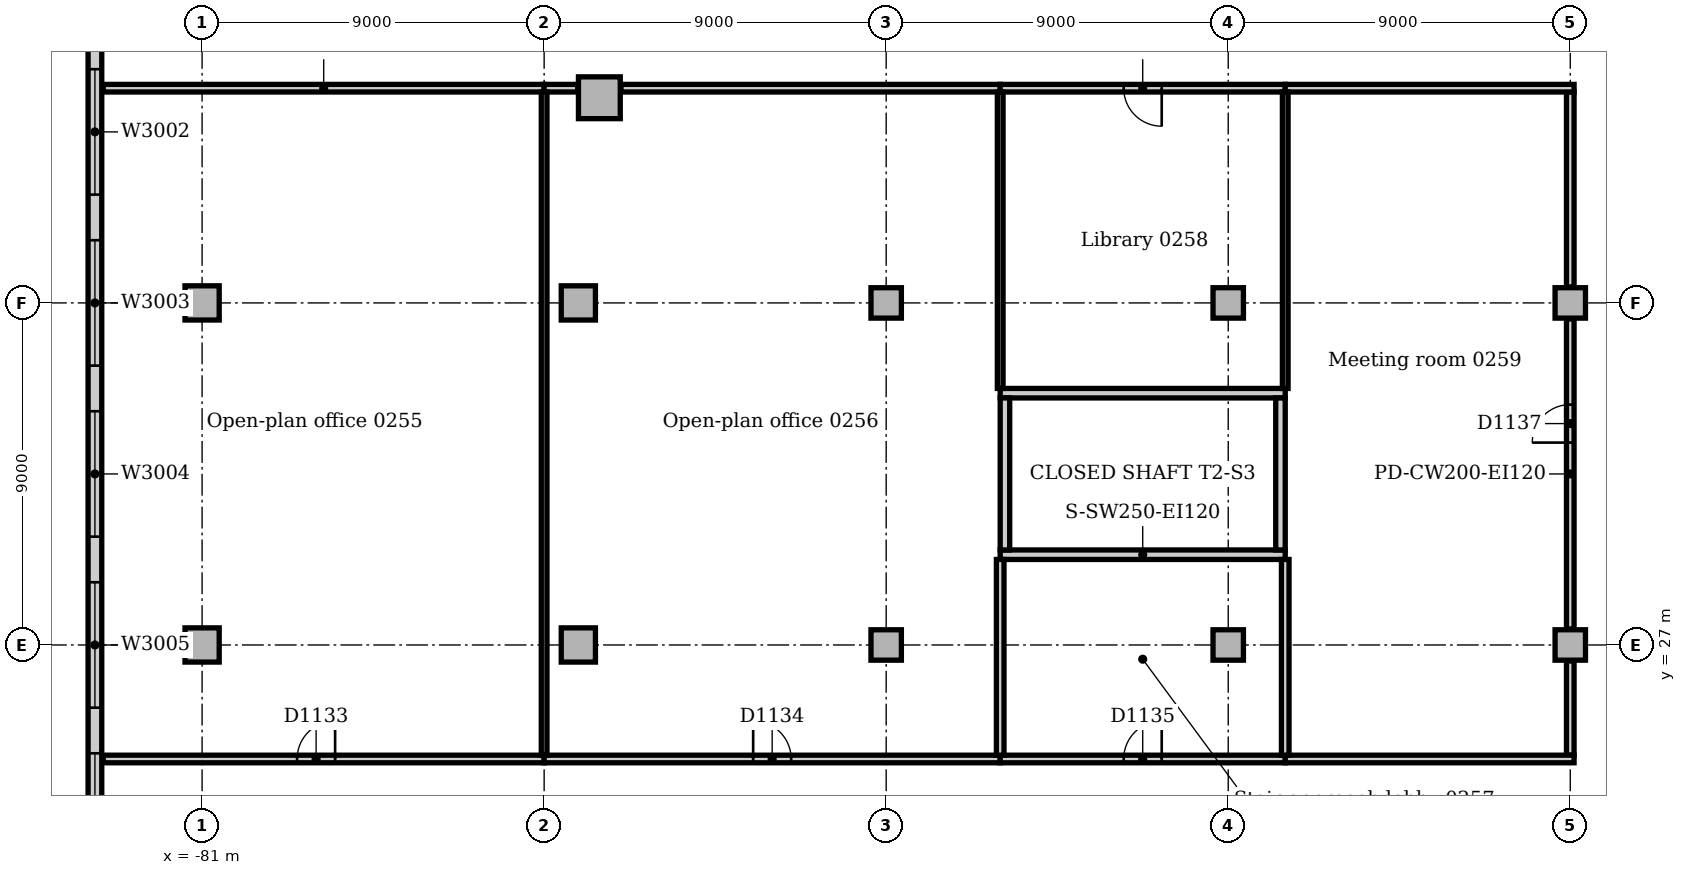
"""IFC4 building model, lengths in metres.
Left out: names, types, materials, properties, quantities, classifications, styles, units other than length and angle.
Written with IfcOpenShell. Run it as: python <this file> out.ifc"""

import sys

from ifc_helpers import new_model, si_unit, direction, frame, frame_2d, origin, origin_2d, place, context, subcontext, project, spatial, rectangle, extrude, element, fill, save


model = new_model("IFC4")
c1 = context("Model", 3, precision=1e-05, world=origin(), true_north=direction((0.0, 1.0)))
c2 = subcontext(c1, "Body", "Model", "MODEL_VIEW")
j1 = project(units=[si_unit("LENGTHUNIT", "METRE"), si_unit("PLANEANGLEUNIT", "RADIAN")], contexts=[c1])
p1 = place(None, origin())
s1 = spatial("IfcSite", under=j1, at=p1, CompositionType="ELEMENT")
p2 = place(p1, origin())
s2 = spatial("IfcBuilding", under=s1, at=p2, CompositionType="ELEMENT")
p3 = place(p2, frame((0.0, 0.0, 11.0)))
s3 = spatial("IfcBuildingStorey", under=s2, at=p3, CompositionType="ELEMENT", Elevation=11.0)
for number, where, z_axis, x_axis in (
    (1, (-60.0, 29.375, 0.0), (0.0, 0.0, 1.0), (1.0, 0.0, 0.0)),
    (2, (-52.5, 33.625, 0.0), (0.0, 0.0, 1.0), (-1.0, 0.0, 0.0)),
):
    element("IfcWall", number, at=place(p3, frame(where, z_axis=z_axis, x_axis=x_axis)), inside=s3, PredefinedType="SOLIDWALL", context=c2, shape_type="SweptSolid", body=[
        extrude(rectangle(XDim=7.5, YDim=0.25, at=frame_2d((3.75, 0.0))), origin(), (0.0, 0.0, 1.0), 5.0),
    ])
for number, where, z_axis, x_axis in (
    (3, (-52.625, 29.5, 0.0), (0.0, 0.0, 1.0), (0.0, 1.0, 0.0)),
    (4, (-59.875, 33.5, 0.0), (0.0, 0.0, 1.0), (0.0, -1.0, 0.0)),
):
    element("IfcWall", number, at=place(p3, frame(where, z_axis=z_axis, x_axis=x_axis)), inside=s3, PredefinedType="SOLIDWALL", context=c2, shape_type="SweptSolid", body=[
        extrude(rectangle(XDim=4.0, YDim=0.25, at=frame_2d((2.0, 0.0))), origin(), (0.0, 0.0, 1.0), 5.0),
    ])
p4 = place(p3, frame((-70.547, 41.398, 0.0), z_axis=(0.0, 0.0, 1.0), x_axis=(1.0, 0.0, 0.0)))
e5 = element("IfcColumn", 5, at=p4, inside=s3, PredefinedType="COLUMN", context=c2, shape_type="SweptSolid", body=[
    extrude(rectangle(XDim=1.1, YDim=1.1, at=origin_2d()), origin(), (0.0, 0.0, 1.0), 4.7),
])
for number, where, z_axis, x_axis in (
    (6, (-71.1, 27.0, 0.0), (0.0, 0.0, 1.0), (1.0, 0.0, 0.0)),
    (7, (-71.1, 36.0, 0.0), (0.0, 0.0, 1.0), (1.0, 0.0, 0.0)),
):
    element("IfcColumn", number, at=place(p3, frame(where, z_axis=z_axis, x_axis=x_axis)), inside=s3, PredefinedType="COLUMN", context=c2, shape_type="SweptSolid", body=[
        extrude(rectangle(XDim=0.9, YDim=0.9, at=origin_2d()), origin(), (0.0, 0.0, 1.0), 4.7),
    ])
for number, where, z_axis, x_axis in (
    (8, (-63.0, 27.0, 0.0), (0.0, 0.0, 1.0), (1.0, 0.0, 0.0)),
    (9, (-63.0, 36.0, 0.0), (0.0, 0.0, 1.0), (1.0, 0.0, 0.0)),
    (10, (-54.0, 27.0, 0.0), (0.0, 0.0, 1.0), (1.0, 0.0, 0.0)),
    (11, (-54.0, 36.0, 0.0), (0.0, 0.0, 1.0), (1.0, 0.0, 0.0)),
    (12, (-45.0, 27.0, 0.0), (0.0, 0.0, 1.0), (1.0, 0.0, 0.0)),
    (13, (-45.0, 36.0, 0.0), (0.0, 0.0, 1.0), (1.0, 0.0, 0.0)),
):
    element("IfcColumn", number, at=place(p3, frame(where, z_axis=z_axis, x_axis=x_axis)), inside=s3, PredefinedType="COLUMN", context=c2, shape_type="SweptSolid", body=[
        extrude(rectangle(XDim=0.8, YDim=0.8, at=origin_2d()), origin(), (0.0, 0.0, 1.0), 4.7),
    ])
for number, where, z_axis, x_axis in (
    (14, (-81.0, 27.0, 0.0), (0.0, 0.0, 1.0), (1.0, 0.0, 0.0)),
    (15, (-81.0, 36.0, 0.0), (0.0, 0.0, 1.0), (1.0, 0.0, 0.0)),
):
    element("IfcColumn", number, at=place(p3, frame(where, z_axis=z_axis, x_axis=x_axis)), inside=s3, PredefinedType="COLUMN", context=c2, shape_type="SweptSolid", body=[
        extrude(rectangle(XDim=0.9, YDim=0.9, at=origin_2d()), origin(), (0.0, 0.0, 1.0), 4.7),
    ])
p5 = place(p3, frame((-83.82, 54.0, 0.0), z_axis=(0.0, 0.0, 1.0), x_axis=(0.0, -1.0, 0.0)))
e16 = element("IfcWall", 16, at=p5, inside=s3, PredefinedType="STANDARD", context=c2, shape_type="SweptSolid", body=[
    extrude(rectangle(XDim=63.0, YDim=0.36, at=frame_2d((31.5, 0.0))), origin(), (0.0, 0.0, 1.0), 4.7),
])
p6 = place(p5, frame((2.85, 0.0, 0.9)))
e17 = element("IfcOpeningElement", 17, at=p6, cuts=e16, PredefinedType="OPENING", context=c2, shape_type="SweptSolid", body=[
    extrude(rectangle(XDim=3.3, YDim=2.4, at=frame_2d((1.65, 1.2))), frame((0.0, 0.19, 0.0), z_axis=(0.0, -1.0, 0.0), x_axis=(1.0, 0.0, 0.0)), (0.0, 0.0, 1.0), 0.38),
])
p7 = place(p5, frame((7.35, 0.0, 0.9)))
e18 = element("IfcOpeningElement", 18, at=p7, cuts=e16, PredefinedType="OPENING", context=c2, shape_type="SweptSolid", body=[
    extrude(rectangle(XDim=3.3, YDim=2.4, at=frame_2d((1.65, 1.2))), frame((0.0, 0.19, 0.0), z_axis=(0.0, -1.0, 0.0), x_axis=(1.0, 0.0, 0.0)), (0.0, 0.0, 1.0), 0.38),
])
p8 = place(p5, frame((11.85, 0.0, 0.9)))
e19 = element("IfcOpeningElement", 19, at=p8, cuts=e16, PredefinedType="OPENING", context=c2, shape_type="SweptSolid", body=[
    extrude(rectangle(XDim=3.3, YDim=2.4, at=frame_2d((1.65, 1.2))), frame((0.0, 0.19, 0.0), z_axis=(0.0, -1.0, 0.0), x_axis=(1.0, 0.0, 0.0)), (0.0, 0.0, 1.0), 0.38),
])
p9 = place(p5, frame((16.35, 0.0, 0.9)))
e20 = element("IfcOpeningElement", 20, at=p9, cuts=e16, PredefinedType="OPENING", context=c2, shape_type="SweptSolid", body=[
    extrude(rectangle(XDim=3.3, YDim=2.4, at=frame_2d((1.65, 1.2))), frame((0.0, 0.19, 0.0), z_axis=(0.0, -1.0, 0.0), x_axis=(1.0, 0.0, 0.0)), (0.0, 0.0, 1.0), 0.38),
])
p10 = place(p5, frame((20.85, 0.0, 0.9)))
e21 = element("IfcOpeningElement", 21, at=p10, cuts=e16, PredefinedType="OPENING", context=c2, shape_type="SweptSolid", body=[
    extrude(rectangle(XDim=3.3, YDim=2.4, at=frame_2d((1.65, 1.2))), frame((0.0, 0.19, 0.0), z_axis=(0.0, -1.0, 0.0), x_axis=(1.0, 0.0, 0.0)), (0.0, 0.0, 1.0), 0.38),
])
p11 = place(p5, frame((25.35, 0.0, 0.9)))
e22 = element("IfcOpeningElement", 22, at=p11, cuts=e16, PredefinedType="OPENING", context=c2, shape_type="SweptSolid", body=[
    extrude(rectangle(XDim=3.3, YDim=2.4, at=frame_2d((1.65, 1.2))), frame((0.0, 0.19, 0.0), z_axis=(0.0, -1.0, 0.0), x_axis=(1.0, 0.0, 0.0)), (0.0, 0.0, 1.0), 0.38),
])
p12 = place(p5, frame((29.85, 0.0, 0.9)))
e23 = element("IfcOpeningElement", 23, at=p12, cuts=e16, PredefinedType="OPENING", context=c2, shape_type="SweptSolid", body=[
    extrude(rectangle(XDim=3.3, YDim=2.4, at=frame_2d((1.65, 1.2))), frame((0.0, 0.19, 0.0), z_axis=(0.0, -1.0, 0.0), x_axis=(1.0, 0.0, 0.0)), (0.0, 0.0, 1.0), 0.38),
])
p13 = place(p5, frame((34.35, 0.0, 0.9)))
e24 = element("IfcOpeningElement", 24, at=p13, cuts=e16, PredefinedType="OPENING", context=c2, shape_type="SweptSolid", body=[
    extrude(rectangle(XDim=3.3, YDim=2.4, at=frame_2d((1.65, 1.2))), frame((0.0, 0.19, 0.0), z_axis=(0.0, -1.0, 0.0), x_axis=(1.0, 0.0, 0.0)), (0.0, 0.0, 1.0), 0.38),
])
p14 = place(p5, frame((38.85, 0.0, 0.9)))
e25 = element("IfcOpeningElement", 25, at=p14, cuts=e16, PredefinedType="OPENING", context=c2, shape_type="SweptSolid", body=[
    extrude(rectangle(XDim=3.3, YDim=2.4, at=frame_2d((1.65, 1.2))), frame((0.0, 0.19, 0.0), z_axis=(0.0, -1.0, 0.0), x_axis=(1.0, 0.0, 0.0)), (0.0, 0.0, 1.0), 0.38),
])
p15 = place(p5, frame((43.35, 0.0, 0.9)))
e26 = element("IfcOpeningElement", 26, at=p15, cuts=e16, PredefinedType="OPENING", context=c2, shape_type="SweptSolid", body=[
    extrude(rectangle(XDim=3.3, YDim=2.4, at=frame_2d((1.65, 1.2))), frame((0.0, 0.19, 0.0), z_axis=(0.0, -1.0, 0.0), x_axis=(1.0, 0.0, 0.0)), (0.0, 0.0, 1.0), 0.38),
])
p16 = place(p5, frame((47.85, 0.0, 0.9)))
e27 = element("IfcOpeningElement", 27, at=p16, cuts=e16, PredefinedType="OPENING", context=c2, shape_type="SweptSolid", body=[
    extrude(rectangle(XDim=3.3, YDim=2.4, at=frame_2d((1.65, 1.2))), frame((0.0, 0.19, 0.0), z_axis=(0.0, -1.0, 0.0), x_axis=(1.0, 0.0, 0.0)), (0.0, 0.0, 1.0), 0.38),
])
p17 = place(p5, frame((52.35, 0.0, 0.9)))
e28 = element("IfcOpeningElement", 28, at=p17, cuts=e16, PredefinedType="OPENING", context=c2, shape_type="SweptSolid", body=[
    extrude(rectangle(XDim=3.3, YDim=2.4, at=frame_2d((1.65, 1.2))), frame((0.0, 0.19, 0.0), z_axis=(0.0, -1.0, 0.0), x_axis=(1.0, 0.0, 0.0)), (0.0, 0.0, 1.0), 0.38),
])
p18 = place(p5, frame((56.85, 0.0, 0.9)))
e29 = element("IfcOpeningElement", 29, at=p18, cuts=e16, PredefinedType="OPENING", context=c2, shape_type="SweptSolid", body=[
    extrude(rectangle(XDim=3.3, YDim=2.4, at=frame_2d((1.65, 1.2))), frame((0.0, 0.19, 0.0), z_axis=(0.0, -1.0, 0.0), x_axis=(1.0, 0.0, 0.0)), (0.0, 0.0, 1.0), 0.38),
])
p19 = place(p3, frame((-45.0, 24.1, 0.0), z_axis=(0.0, 0.0, 1.0), x_axis=(0.0, 1.0, 0.0)))
e30 = element("IfcWall", 30, at=p19, inside=s3, PredefinedType="PARTITIONING", context=c2, shape_type="SweptSolid", body=[
    extrude(rectangle(XDim=2.48, YDim=0.2, at=frame_2d((1.24, 0.0))), origin(), (0.0, 0.0, 1.0), 4.7),
])
p20 = place(p3, frame((-45.0, 27.42, 0.0), z_axis=(0.0, 0.0, 1.0), x_axis=(0.0, 1.0, 0.0)))
e31 = element("IfcWall", 31, at=p20, inside=s3, PredefinedType="PARTITIONING", context=c2, shape_type="SweptSolid", body=[
    extrude(rectangle(XDim=8.16, YDim=0.2, at=frame_2d((4.08, 0.0))), origin(), (0.0, 0.0, 1.0), 4.7),
])
p21 = place(p20, frame((4.905, 0.0, 0.0)))
e32 = element("IfcOpeningElement", 32, at=p21, cuts=e31, PredefinedType="OPENING", context=c2, shape_type="SweptSolid", body=[
    extrude(rectangle(XDim=1.0, YDim=2.1, at=frame_2d((0.5, 1.05))), frame((0.0, 0.11, 0.0), z_axis=(0.0, -1.0, 0.0), x_axis=(1.0, 0.0, 0.0)), (0.0, 0.0, 1.0), 0.22),
])
p22 = place(p3, frame((-45.0, 36.42, 0.0), z_axis=(0.0, 0.0, 1.0), x_axis=(0.0, 1.0, 0.0)))
e33 = element("IfcWall", 33, at=p22, inside=s3, PredefinedType="PARTITIONING", context=c2, shape_type="SweptSolid", body=[
    extrude(rectangle(XDim=5.13, YDim=0.2, at=frame_2d((2.565, 0.0))), origin(), (0.0, 0.0, 1.0), 4.7),
])
p23 = place(p3, frame((-83.6, 24.0, 0.0), z_axis=(0.0, 0.0, 1.0), x_axis=(1.0, 0.0, 0.0)))
e34 = element("IfcWall", 34, at=p23, inside=s3, PredefinedType="PARTITIONING", context=c2, shape_type="SweptSolid", body=[
    extrude(rectangle(XDim=11.6, YDim=0.2, at=frame_2d((5.8, 0.0))), origin(), (0.0, 0.0, 1.0), 4.7),
])
p24 = place(p23, frame((5.1, 0.0, 0.0)))
e35 = element("IfcOpeningElement", 35, at=p24, cuts=e34, PredefinedType="OPENING", context=c2, shape_type="SweptSolid", body=[
    extrude(rectangle(XDim=1.0, YDim=2.1, at=frame_2d((0.5, 1.05))), frame((0.0, 0.11, 0.0), z_axis=(0.0, -1.0, 0.0), x_axis=(1.0, 0.0, 0.0)), (0.0, 0.0, 1.0), 0.22),
])
p25 = place(p3, frame((-72.0, 24.0, 0.0), z_axis=(0.0, 0.0, 1.0), x_axis=(1.0, 0.0, 0.0)))
e36 = element("IfcWall", 36, at=p25, inside=s3, PredefinedType="PARTITIONING", context=c2, shape_type="SweptSolid", body=[
    extrude(rectangle(XDim=12.0, YDim=0.2, at=frame_2d((6.0, 0.0))), origin(), (0.0, 0.0, 1.0), 4.7),
])
p26 = place(p25, frame((5.5, 0.0, 0.0)))
e37 = element("IfcOpeningElement", 37, at=p26, cuts=e36, PredefinedType="OPENING", context=c2, shape_type="SweptSolid", body=[
    extrude(rectangle(XDim=1.0, YDim=2.1, at=frame_2d((0.5, 1.05))), frame((0.0, 0.11, 0.0), z_axis=(0.0, -1.0, 0.0), x_axis=(1.0, 0.0, 0.0)), (0.0, 0.0, 1.0), 0.22),
])
p27 = place(p3, frame((-60.0, 24.0, 0.0), z_axis=(0.0, 0.0, 1.0), x_axis=(1.0, 0.0, 0.0)))
e38 = element("IfcWall", 38, at=p27, inside=s3, PredefinedType="PARTITIONING", context=c2, shape_type="SweptSolid", body=[
    extrude(rectangle(XDim=7.5, YDim=0.2, at=frame_2d((3.75, 0.0))), origin(), (0.0, 0.0, 1.0), 4.7),
])
p28 = place(p27, frame((3.25, 0.0, 0.0)))
e39 = element("IfcOpeningElement", 39, at=p28, cuts=e38, PredefinedType="OPENING", context=c2, shape_type="SweptSolid", body=[
    extrude(rectangle(XDim=1.0, YDim=2.1, at=frame_2d((0.5, 1.05))), frame((0.0, 0.11, 0.0), z_axis=(0.0, -1.0, 0.0), x_axis=(1.0, 0.0, 0.0)), (0.0, 0.0, 1.0), 0.22),
])
p29 = place(p3, frame((-52.5, 24.0, 0.0), z_axis=(0.0, 0.0, 1.0), x_axis=(1.0, 0.0, 0.0)))
e40 = element("IfcWall", 40, at=p29, inside=s3, PredefinedType="PARTITIONING", context=c2, shape_type="SweptSolid", body=[
    extrude(rectangle(XDim=7.6, YDim=0.2, at=frame_2d((3.8, 0.0))), origin(), (0.0, 0.0, 1.0), 4.7),
])
p30 = place(p3, frame((-83.6, 41.65, 0.0), z_axis=(0.0, 0.0, 1.0), x_axis=(1.0, 0.0, 0.0)))
e41 = element("IfcWall", 41, at=p30, inside=s3, PredefinedType="PARTITIONING", context=c2, shape_type="SweptSolid", body=[
    extrude(rectangle(XDim=11.6, YDim=0.2, at=frame_2d((5.8, 0.0))), origin(), (0.0, 0.0, 1.0), 4.7),
])
p31 = place(p3, frame((-72.0, 41.65, 0.0), z_axis=(0.0, 0.0, 1.0), x_axis=(1.0, 0.0, 0.0)))
e42 = element("IfcWall", 42, at=p31, inside=s3, PredefinedType="PARTITIONING", context=c2, shape_type="SweptSolid", body=[
    extrude(rectangle(XDim=0.883, YDim=0.2, at=frame_2d((0.442, 0.0))), origin(), (0.0, 0.0, 1.0), 4.7),
])
p32 = place(p3, frame((-69.977, 41.65, 0.0), z_axis=(0.0, 0.0, 1.0), x_axis=(1.0, 0.0, 0.0)))
e43 = element("IfcWall", 43, at=p32, inside=s3, PredefinedType="PARTITIONING", context=c2, shape_type="SweptSolid", body=[
    extrude(rectangle(XDim=9.977, YDim=0.2, at=frame_2d((4.989, 0.0))), origin(), (0.0, 0.0, 1.0), 4.7),
])
p33 = place(p3, frame((-60.0, 41.65, 0.0), z_axis=(0.0, 0.0, 1.0), x_axis=(1.0, 0.0, 0.0)))
e44 = element("IfcWall", 44, at=p33, inside=s3, PredefinedType="PARTITIONING", context=c2, shape_type="SweptSolid", body=[
    extrude(rectangle(XDim=7.5, YDim=0.2, at=frame_2d((3.75, 0.0))), origin(), (0.0, 0.0, 1.0), 4.7),
])
p34 = place(p33, frame((3.25, 0.0, 0.0)))
e45 = element("IfcOpeningElement", 45, at=p34, cuts=e44, PredefinedType="OPENING", context=c2, shape_type="SweptSolid", body=[
    extrude(rectangle(XDim=1.0, YDim=2.1, at=frame_2d((0.5, 1.05))), frame((0.0, 0.11, 0.0), z_axis=(0.0, -1.0, 0.0), x_axis=(1.0, 0.0, 0.0)), (0.0, 0.0, 1.0), 0.22),
])
p35 = place(p3, frame((-52.5, 41.65, 0.0), z_axis=(0.0, 0.0, 1.0), x_axis=(1.0, 0.0, 0.0)))
e46 = element("IfcWall", 46, at=p35, inside=s3, PredefinedType="PARTITIONING", context=c2, shape_type="SweptSolid", body=[
    extrude(rectangle(XDim=7.6, YDim=0.2, at=frame_2d((3.8, 0.0))), origin(), (0.0, 0.0, 1.0), 4.7),
])
p36 = place(p3, frame((-72.0, 24.1, 0.0), z_axis=(0.0, 0.0, 1.0), x_axis=(0.0, 1.0, 0.0)))
e47 = element("IfcWall", 47, at=p36, inside=s3, PredefinedType="PARTITIONING", context=c2, shape_type="SweptSolid", body=[
    extrude(rectangle(XDim=17.45, YDim=0.15, at=frame_2d((8.725, 0.0))), origin(), (0.0, 0.0, 1.0), 4.7),
])
p37 = place(p3, frame((-60.0, 24.1, 0.0), z_axis=(0.0, 0.0, 1.0), x_axis=(0.0, 1.0, 0.0)))
e48 = element("IfcWall", 48, at=p37, inside=s3, PredefinedType="PARTITIONING", context=c2, shape_type="SweptSolid", body=[
    extrude(rectangle(XDim=5.15, YDim=0.2, at=frame_2d((2.575, 0.0))), origin(), (0.0, 0.0, 1.0), 4.7),
])
p38 = place(p3, frame((-60.0, 33.75, 0.0), z_axis=(0.0, 0.0, 1.0), x_axis=(0.0, 1.0, 0.0)))
e49 = element("IfcWall", 49, at=p38, inside=s3, PredefinedType="PARTITIONING", context=c2, shape_type="SweptSolid", body=[
    extrude(rectangle(XDim=7.8, YDim=0.15, at=frame_2d((3.9, 0.0))), origin(), (0.0, 0.0, 1.0), 4.7),
])
p39 = place(p3, frame((-52.5, 24.1, 0.0), z_axis=(0.0, 0.0, 1.0), x_axis=(0.0, 1.0, 0.0)))
e50 = element("IfcWall", 50, at=p39, inside=s3, PredefinedType="PARTITIONING", context=c2, shape_type="SweptSolid", body=[
    extrude(rectangle(XDim=5.15, YDim=0.2, at=frame_2d((2.575, 0.0))), origin(), (0.0, 0.0, 1.0), 4.7),
])
p40 = place(p3, frame((-52.5, 33.75, 0.0), z_axis=(0.0, 0.0, 1.0), x_axis=(0.0, 1.0, 0.0)))
e51 = element("IfcWall", 51, at=p40, inside=s3, PredefinedType="PARTITIONING", context=c2, shape_type="SweptSolid", body=[
    extrude(rectangle(XDim=7.8, YDim=0.15, at=frame_2d((3.9, 0.0))), origin(), (0.0, 0.0, 1.0), 4.7),
])
p41 = place(p8, origin())
e52 = element("IfcWindow", 52, at=p41, inside=s3, PartitioningType="SINGLE_PANEL", PredefinedType="WINDOW", context=c2, shape_type="SweptSolid", body=[
    extrude(rectangle(XDim=3.3, YDim=2.4, at=frame_2d((1.65, 1.2))), frame((0.0, 0.13, 0.0), z_axis=(0.0, -1.0, 0.0), x_axis=(1.0, 0.0, 0.0)), (0.0, 0.0, 1.0), 0.06),
])
fill(e19, e52)
p42 = place(p9, origin())
e53 = element("IfcWindow", 53, at=p42, inside=s3, PartitioningType="SINGLE_PANEL", PredefinedType="WINDOW", context=c2, shape_type="SweptSolid", body=[
    extrude(rectangle(XDim=3.3, YDim=2.4, at=frame_2d((1.65, 1.2))), frame((0.0, 0.13, 0.0), z_axis=(0.0, -1.0, 0.0), x_axis=(1.0, 0.0, 0.0)), (0.0, 0.0, 1.0), 0.06),
])
fill(e20, e53)
p43 = place(p10, origin())
e54 = element("IfcWindow", 54, at=p43, inside=s3, PartitioningType="SINGLE_PANEL", PredefinedType="WINDOW", context=c2, shape_type="SweptSolid", body=[
    extrude(rectangle(XDim=3.3, YDim=2.4, at=frame_2d((1.65, 1.2))), frame((0.0, 0.13, 0.0), z_axis=(0.0, -1.0, 0.0), x_axis=(1.0, 0.0, 0.0)), (0.0, 0.0, 1.0), 0.06),
])
fill(e21, e54)
p44 = place(p11, origin())
e55 = element("IfcWindow", 55, at=p44, inside=s3, PartitioningType="SINGLE_PANEL", PredefinedType="WINDOW", context=c2, shape_type="SweptSolid", body=[
    extrude(rectangle(XDim=3.3, YDim=2.4, at=frame_2d((1.65, 1.2))), frame((0.0, 0.13, 0.0), z_axis=(0.0, -1.0, 0.0), x_axis=(1.0, 0.0, 0.0)), (0.0, 0.0, 1.0), 0.06),
])
fill(e22, e55)
p45 = place(p12, origin())
e56 = element("IfcWindow", 56, at=p45, inside=s3, PartitioningType="SINGLE_PANEL", PredefinedType="WINDOW", context=c2, shape_type="SweptSolid", body=[
    extrude(rectangle(XDim=3.3, YDim=2.4, at=frame_2d((1.65, 1.2))), frame((0.0, 0.13, 0.0), z_axis=(0.0, -1.0, 0.0), x_axis=(1.0, 0.0, 0.0)), (0.0, 0.0, 1.0), 0.06),
])
fill(e23, e56)
p46 = place(p24, origin())
e57 = element("IfcDoor", 57, at=p46, inside=s3, OperationType="SINGLE_SWING_RIGHT", PredefinedType="DOOR", context=c2, shape_type="SweptSolid", body=[
    extrude(rectangle(XDim=1.0, YDim=2.1, at=frame_2d((0.5, 1.05))), frame((0.0, 0.025, 0.0), z_axis=(0.0, -1.0, 0.0), x_axis=(1.0, 0.0, 0.0)), (0.0, 0.0, 1.0), 0.05),
])
fill(e35, e57)
p47 = place(p26, origin())
e58 = element("IfcDoor", 58, at=p47, inside=s3, OperationType="SINGLE_SWING_LEFT", PredefinedType="DOOR", context=c2, shape_type="SweptSolid", body=[
    extrude(rectangle(XDim=1.0, YDim=2.1, at=frame_2d((0.5, 1.05))), frame((0.0, 0.025, 0.0), z_axis=(0.0, -1.0, 0.0), x_axis=(1.0, 0.0, 0.0)), (0.0, 0.0, 1.0), 0.05),
])
fill(e37, e58)
p48 = place(p28, origin())
e59 = element("IfcDoor", 59, at=p48, inside=s3, OperationType="SINGLE_SWING_RIGHT", PredefinedType="DOOR", context=c2, shape_type="SweptSolid", body=[
    extrude(rectangle(XDim=1.0, YDim=2.1, at=frame_2d((0.5, 1.05))), frame((0.0, 0.025, 0.0), z_axis=(0.0, -1.0, 0.0), x_axis=(1.0, 0.0, 0.0)), (0.0, 0.0, 1.0), 0.05),
])
fill(e39, e59)
p49 = place(p34, frame((1.0, 0.0, 0.0), z_axis=(0.0, 0.0, 1.0), x_axis=(-1.0, 0.0, 0.0)))
e60 = element("IfcDoor", 60, at=p49, inside=s3, OperationType="SINGLE_SWING_LEFT", PredefinedType="DOOR", context=c2, shape_type="SweptSolid", body=[
    extrude(rectangle(XDim=1.0, YDim=2.1, at=frame_2d((0.5, 1.05))), frame((0.0, 0.025, 0.0), z_axis=(0.0, -1.0, 0.0), x_axis=(1.0, 0.0, 0.0)), (0.0, 0.0, 1.0), 0.05),
])
fill(e45, e60)
p50 = place(p21, origin())
e61 = element("IfcDoor", 61, at=p50, inside=s3, OperationType="SINGLE_SWING_LEFT", PredefinedType="DOOR", context=c2, shape_type="SweptSolid", body=[
    extrude(rectangle(XDim=1.0, YDim=2.1, at=frame_2d((0.5, 1.05))), frame((0.0, 0.025, 0.0), z_axis=(0.0, -1.0, 0.0), x_axis=(1.0, 0.0, 0.0)), (0.0, 0.0, 1.0), 0.05),
])
fill(e32, e61)
save(model, sys.argv[1])
